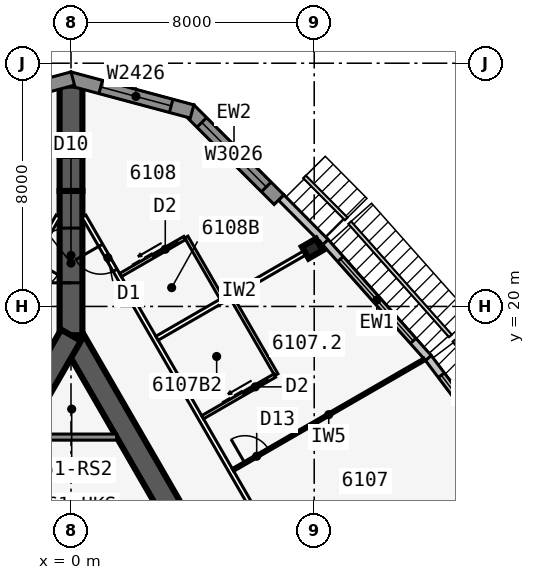
"""IFC4 building model, lengths in metres.
Left out: names, types, materials, properties, quantities, classifications, styles, units other than length and angle.
Written with IfcOpenShell. Run it as: python <this file> out.ifc"""

import sys

from ifc_helpers import new_model, si_unit, direction, frame, frame_2d, origin, origin_2d, place, context, subcontext, project, spatial, polyline, rectangle, i_section, outline, extrude, element, fill, save


model = new_model("IFC4")
c1 = context("Model", 3, precision=1e-05, world=origin(), true_north=direction((0.0, 1.0)))
c2 = subcontext(c1, "Body", "Model", "MODEL_VIEW")
j1 = project(units=[si_unit("LENGTHUNIT", "METRE"), si_unit("PLANEANGLEUNIT", "RADIAN")], contexts=[c1])
p1 = place(None, origin())
s1 = spatial("IfcSite", under=j1, at=p1, CompositionType="ELEMENT")
p2 = place(p1, origin())
s2 = spatial("IfcBuilding", under=s1, at=p2, CompositionType="ELEMENT")
p3 = place(p2, frame((0.0, 0.0, 229.7)))
s3 = spatial("IfcBuildingStorey", under=s2, at=p3, CompositionType="ELEMENT", Elevation=229.7)
p4 = place(p3, frame((16.5, -9.526, 0.0), z_axis=(0.0, 0.0, 1.0), x_axis=(-0.499999749417, 0.866025548458, 0.0)))
e1 = element("IfcWall", 1, at=p4, inside=s3, PredefinedType="SHEAR", context=c2, shape_type="SweptSolid", body=[
    extrude(rectangle(XDim=33.0, YDim=0.75, at=frame_2d((16.5, 0.0))), origin(), (0.0, 0.0, 1.0), 3.6),
])
p5 = place(p4, frame((14.15, 0.0, 0.0)))
e2 = element("IfcOpeningElement", 2, at=p5, cuts=e1, PredefinedType="OPENING", context=c2, shape_type="SweptSolid", body=[
    extrude(rectangle(XDim=1.8, YDim=2.13, at=frame_2d((0.9, 1.065))), frame((0.0, 0.385, 0.0), z_axis=(0.0, -1.0, 0.0), x_axis=(1.0, 0.0, 0.0)), (0.0, 0.0, 1.0), 0.77),
])
p6 = place(p4, frame((12.6, 0.0, 0.0)))
e3 = element("IfcOpeningElement", 3, at=p6, cuts=e1, PredefinedType="OPENING", context=c2, shape_type="SweptSolid", body=[
    extrude(rectangle(XDim=1.0, YDim=2.13, at=frame_2d((0.5, 1.065))), frame((0.0, 0.385, 0.0), z_axis=(0.0, -1.0, 0.0), x_axis=(1.0, 0.0, 0.0)), (0.0, 0.0, 1.0), 0.77),
])
p7 = place(p3, frame((0.0, 19.052, 0.0), z_axis=(0.0, 0.0, 1.0), x_axis=(-0.499999749417, -0.866025548458, 0.0)))
e4 = element("IfcWall", 4, at=p7, inside=s3, PredefinedType="SHEAR", context=c2, shape_type="SweptSolid", body=[
    extrude(rectangle(XDim=33.0, YDim=0.75, at=frame_2d((16.5, 0.0))), origin(), (0.0, 0.0, 1.0), 3.6),
])
p8 = place(p7, frame((14.15, 0.0, 0.0)))
e5 = element("IfcOpeningElement", 5, at=p8, cuts=e4, PredefinedType="OPENING", context=c2, shape_type="SweptSolid", body=[
    extrude(rectangle(XDim=1.8, YDim=2.13, at=frame_2d((0.9, 1.065))), frame((0.0, 0.385, 0.0), z_axis=(0.0, -1.0, 0.0), x_axis=(1.0, 0.0, 0.0)), (0.0, 0.0, 1.0), 0.77),
])
p9 = place(p7, frame((12.6, 0.0, 0.0)))
e6 = element("IfcOpeningElement", 6, at=p9, cuts=e4, PredefinedType="OPENING", context=c2, shape_type="SweptSolid", body=[
    extrude(rectangle(XDim=1.0, YDim=2.13, at=frame_2d((0.5, 1.065))), frame((0.0, 0.385, 0.0), z_axis=(0.0, -1.0, 0.0), x_axis=(1.0, 0.0, 0.0)), (0.0, 0.0, 1.0), 0.77),
])
p10 = place(p3, frame((0.0, 19.052, 0.0), z_axis=(0.0, 0.0, 1.0), x_axis=(0.0, 1.0, 0.0)))
e7 = element("IfcWall", 7, at=p10, inside=s3, PredefinedType="SHEAR", context=c2, shape_type="SweptSolid", body=[
    extrude(rectangle(XDim=4.746, YDim=0.75, at=frame_2d((2.373, 0.0))), origin(), (0.0, 0.0, 1.0), 3.6),
])
p11 = place(p10, frame((1.725, 0.0, 0.0)))
e8 = element("IfcOpeningElement", 8, at=p11, cuts=e7, PredefinedType="OPENING", context=c2, shape_type="SweptSolid", body=[
    extrude(rectangle(XDim=1.8, YDim=2.13, at=frame_2d((0.9, 1.065))), frame((0.0, 0.385, 0.0), z_axis=(0.0, -1.0, 0.0), x_axis=(1.0, 0.0, 0.0)), (0.0, 0.0, 1.0), 0.77),
])
p12 = place(p3, frame((0.0, 23.799, 0.0), z_axis=(0.0, 0.0, 1.0), x_axis=(0.0, 1.0, 0.0)))
e9 = element("IfcWall", 9, at=p12, inside=s3, PredefinedType="SHEAR", context=c2, shape_type="SweptSolid", body=[
    extrude(rectangle(XDim=1.155, YDim=0.75, at=frame_2d((0.577, 0.0))), origin(), (0.0, 0.0, 1.0), 3.6),
])
p13 = place(p3, frame((0.0, 24.953, 0.0), z_axis=(0.0, 0.0, 1.0), x_axis=(0.0, 1.0, 0.0)))
e10 = element("IfcWall", 10, at=p13, inside=s3, PredefinedType="SHEAR", context=c2, shape_type="SweptSolid", body=[
    extrude(rectangle(XDim=2.309, YDim=0.75, at=frame_2d((1.155, 0.0))), origin(), (0.0, 0.0, 1.0), 3.6),
])
p14 = place(p3, frame((7.937, 21.903, 0.0), z_axis=(0.0, 0.0, 1.0), x_axis=(-0.5, 0.866025403784, 0.0)))
e11 = element("IfcColumn", 11, at=p14, inside=s3, PredefinedType="COLUMN", context=c2, shape_type="SweptSolid", body=[
    extrude(i_section(OverallWidth=0.442, OverallDepth=0.531, WebThickness=0.066, FlangeThickness=0.106, at=origin_2d()), origin(), (0.0, 0.0, 1.0), 3.6),
])
p15 = place(p3, frame((14.783, 14.291, 0.0), z_axis=(0.0, 0.0, 1.0), x_axis=(-0.602408653511, 0.798187831388, 0.0)))
e12 = element("IfcWall", 12, at=p15, inside=s3, PredefinedType="STANDARD", context=c2, shape_type="SweptSolid", body=[
    extrude(rectangle(XDim=5.038, YDim=0.25, at=frame_2d((2.519, 0.0))), origin(), (0.0, 0.0, 1.0), 3.35),
])
p16 = place(p15, frame((0.719, 0.0, 0.45)))
e13 = element("IfcOpeningElement", 13, at=p16, cuts=e12, PredefinedType="OPENING", context=c2, shape_type="SweptSolid", body=[
    extrude(rectangle(XDim=3.6, YDim=2.6, at=frame_2d((1.8, 1.3))), frame((0.0, 0.135, 0.0), z_axis=(0.0, -1.0, 0.0), x_axis=(1.0, 0.0, 0.0)), (0.0, 0.0, 1.0), 0.27),
])
p17 = place(p3, frame((11.754, 18.304, 0.0), z_axis=(0.0, 0.0, 1.0), x_axis=(-0.664348996191, 0.747422511876, 0.0)))
e14 = element("IfcWall", 14, at=p17, inside=s3, PredefinedType="STANDARD", context=c2, shape_type="SweptSolid", body=[
    extrude(rectangle(XDim=5.105, YDim=0.25, at=frame_2d((2.552, 0.0))), origin(), (0.0, 0.0, 1.0), 3.35),
])
p18 = place(p17, frame((0.752, 0.0, 0.45)))
e15 = element("IfcOpeningElement", 15, at=p18, cuts=e14, PredefinedType="OPENING", context=c2, shape_type="SweptSolid", body=[
    extrude(rectangle(XDim=3.6, YDim=2.6, at=frame_2d((1.8, 1.3))), frame((0.0, 0.135, 0.0), z_axis=(0.0, -1.0, 0.0), x_axis=(1.0, 0.0, 0.0)), (0.0, 0.0, 1.0), 0.27),
])
p19 = place(p3, frame((8.368, 22.115, 0.0), z_axis=(0.0, 0.0, 1.0), x_axis=(-0.704149946111, 0.710051303352, 0.0)))
e16 = element("IfcWall", 16, at=p19, inside=s3, PredefinedType="STANDARD", context=c2, shape_type="SweptSolid", body=[
    extrude(rectangle(XDim=2.069, YDim=0.25, at=frame_2d((1.034, 0.0))), origin(), (0.0, 0.0, 1.0), 3.35),
])
p20 = place(p3, frame((6.841, 23.512, 0.0), z_axis=(0.0, 0.0, 1.0), x_axis=(-0.707106781187, 0.707106781187, 0.0)))
e17 = element("IfcWall", 17, at=p20, inside=s3, PredefinedType="SOLIDWALL", context=c2, shape_type="SweptSolid", body=[
    extrude(rectangle(XDim=4.184, YDim=0.45, at=frame_2d((2.092, 0.0))), origin(), (0.0, 0.0, 1.0), 3.35),
])
p21 = place(p20, frame((0.592, 0.0, 0.45)))
e18 = element("IfcOpeningElement", 18, at=p21, cuts=e17, PredefinedType="OPENING", context=c2, shape_type="SweptSolid", body=[
    extrude(rectangle(XDim=3.0, YDim=2.6, at=frame_2d((1.5, 1.3))), frame((0.0, 0.235, 0.0), z_axis=(0.0, -1.0, 0.0), x_axis=(1.0, 0.0, 0.0)), (0.0, 0.0, 1.0), 0.47),
])
p22 = place(p3, frame((3.983, 26.413, 0.0), z_axis=(0.0, 0.0, 1.0), x_axis=(-0.965920442324, 0.258839137498, 0.0)))
e19 = element("IfcWall", 19, at=p22, inside=s3, PredefinedType="SOLIDWALL", context=c2, shape_type="SweptSolid", body=[
    extrude(outline(polyline([(4.184, 0.225), (4.124, 0.225), (3.706, 0.113), (3.676, 0.225), (0.0, 0.225), (0.0, -0.225), (4.184, -0.225), (4.184, 0.225)])), origin(), (0.0, 0.0, 1.0), 3.35),
])
p23 = place(p22, frame((0.713, 0.0, 0.45)))
e20 = element("IfcOpeningElement", 20, at=p23, cuts=e19, PredefinedType="OPENING", context=c2, shape_type="SweptSolid", body=[
    extrude(rectangle(XDim=2.4, YDim=2.6, at=frame_2d((1.2, 1.3))), frame((0.0, 0.235, 0.0), z_axis=(0.0, -1.0, 0.0), x_axis=(1.0, 0.0, 0.0)), (0.0, 0.0, 1.0), 0.47),
])
p24 = place(p3, frame((0.058, 27.496, 0.0), z_axis=(0.0, 0.0, 1.0), x_axis=(-0.965920442324, -0.258839137498, 0.0)))
e21 = element("IfcWall", 21, at=p24, inside=s3, PredefinedType="SOLIDWALL", context=c2, shape_type="SweptSolid", body=[
    extrude(outline(polyline([(4.184, 0.225), (0.509, 0.225), (0.479, 0.113), (0.06, 0.225), (0.0, 0.225), (0.0, -0.225), (4.184, -0.225), (4.184, 0.225)])), origin(), (0.0, 0.0, 1.0), 3.35),
])
p25 = place(p24, frame((1.071, 0.0, 0.45)))
e22 = element("IfcOpeningElement", 22, at=p25, cuts=e21, PredefinedType="OPENING", context=c2, shape_type="SweptSolid", body=[
    extrude(rectangle(XDim=2.4, YDim=2.6, at=frame_2d((1.2, 1.3))), frame((0.0, 0.235, 0.0), z_axis=(0.0, -1.0, 0.0), x_axis=(1.0, 0.0, 0.0)), (0.0, 0.0, 1.0), 0.47),
])
p26 = place(p3, frame((20.102, -11.115, 0.0), z_axis=(0.0, 0.0, 1.0), x_axis=(-0.500000265775, 0.866025250339, 0.0)))
e23 = element("IfcWall", 23, at=p26, inside=s3, PredefinedType="PARTITIONING", context=c2, shape_type="SweptSolid", body=[
    extrude(rectangle(XDim=39.354, YDim=0.15, at=frame_2d((19.677, 0.0))), origin(), (0.0, 0.0, 1.0), 3.35),
])
p27 = place(p26, frame((1.102, 0.0, 0.0)))
e24 = element("IfcOpeningElement", 24, at=p27, cuts=e23, PredefinedType="OPENING", context=c2, shape_type="SweptSolid", body=[
    extrude(rectangle(XDim=0.95, YDim=2.13, at=frame_2d((0.475, 1.065))), frame((0.0, 0.085, 0.0), z_axis=(0.0, -1.0, 0.0), x_axis=(1.0, 0.0, 0.0)), (0.0, 0.0, 1.0), 0.17),
])
p28 = place(p26, frame((11.702, 0.0, 0.0)))
e25 = element("IfcOpeningElement", 25, at=p28, cuts=e23, PredefinedType="OPENING", context=c2, shape_type="SweptSolid", body=[
    extrude(rectangle(XDim=0.95, YDim=2.13, at=frame_2d((0.475, 1.065))), frame((0.0, 0.085, 0.0), z_axis=(0.0, -1.0, 0.0), x_axis=(1.0, 0.0, 0.0)), (0.0, 0.0, 1.0), 0.17),
])
p29 = place(p26, frame((26.702, 0.0, 0.0)))
e26 = element("IfcOpeningElement", 26, at=p29, cuts=e23, PredefinedType="OPENING", context=c2, shape_type="SweptSolid", body=[
    extrude(rectangle(XDim=0.95, YDim=2.13, at=frame_2d((0.475, 1.065))), frame((0.0, 0.085, 0.0), z_axis=(0.0, -1.0, 0.0), x_axis=(1.0, 0.0, 0.0)), (0.0, 0.0, 1.0), 0.17),
])
p30 = place(p26, frame((37.302, 0.0, 0.0)))
e27 = element("IfcOpeningElement", 27, at=p30, cuts=e23, PredefinedType="OPENING", context=c2, shape_type="SweptSolid", body=[
    extrude(rectangle(XDim=0.95, YDim=2.13, at=frame_2d((0.475, 1.065))), frame((0.0, 0.085, 0.0), z_axis=(0.0, -1.0, 0.0), x_axis=(1.0, 0.0, 0.0)), (0.0, 0.0, 1.0), 0.17),
])
p31 = place(p3, frame((7.829, 10.293, 0.0), z_axis=(0.0, 0.0, 1.0), x_axis=(0.866030558329, 0.49999107196, 0.0)))
e28 = element("IfcWall", 28, at=p31, inside=s3, PredefinedType="PARTITIONING", context=c2, shape_type="SweptSolid", body=[
    extrude(rectangle(XDim=7.894, YDim=0.1, at=frame_2d((3.947, 0.0))), origin(), (0.0, 0.0, 1.0), 2.25),
])
p32 = place(p31, frame((0.45, 0.0, 0.0)))
e29 = element("IfcOpeningElement", 29, at=p32, cuts=e28, PredefinedType="OPENING", context=c2, shape_type="SweptSolid", body=[
    extrude(rectangle(XDim=0.9, YDim=2.13, at=frame_2d((0.45, 1.065))), frame((0.0, 0.06, 0.0), z_axis=(0.0, -1.0, 0.0), x_axis=(1.0, 0.0, 0.0)), (0.0, 0.0, 1.0), 0.12),
])
p33 = place(p3, frame((5.329, 14.623, 0.0), z_axis=(0.0, 0.0, 1.0), x_axis=(0.866017877653, 0.500013035415, 0.0)))
e30 = element("IfcWall", 30, at=p33, inside=s3, PredefinedType="PARTITIONING", context=c2, shape_type="SweptSolid", body=[
    extrude(rectangle(XDim=7.273, YDim=0.1, at=frame_2d((3.636, 0.0))), origin(), (0.0, 0.0, 1.0), 2.309),
])
p34 = place(p33, frame((0.45, 0.0, 0.0)))
e31 = element("IfcOpeningElement", 31, at=p34, cuts=e30, PredefinedType="OPENING", context=c2, shape_type="SweptSolid", body=[
    extrude(rectangle(XDim=0.9, YDim=2.13, at=frame_2d((0.45, 1.065))), frame((0.0, 0.06, 0.0), z_axis=(0.0, -1.0, 0.0), x_axis=(1.0, 0.0, 0.0)), (0.0, 0.0, 1.0), 0.12),
])
p35 = place(p3, frame((2.829, 18.954, 0.0), z_axis=(0.0, 0.0, 1.0), x_axis=(0.866026604282, 0.499997920671, 0.0)))
e32 = element("IfcWall", 32, at=p35, inside=s3, PredefinedType="PARTITIONING", context=c2, shape_type="SweptSolid", body=[
    extrude(rectangle(XDim=6.24, YDim=0.15, at=frame_2d((3.12, 0.0))), origin(), (0.0, 0.0, 1.0), 2.25),
])
p36 = place(p3, frame((6.753, 17.755, 0.0), z_axis=(0.0, 0.0, 1.0), x_axis=(-0.499990139034, 0.866031096941, 0.0)))
e33 = element("IfcWall", 33, at=p36, inside=s3, PredefinedType="PLUMBINGWALL", context=c2, shape_type="SweptSolid", body=[
    extrude(rectangle(XDim=3.0, YDim=0.12, at=frame_2d((1.5, 0.0))), origin(), (0.0, 0.0, 1.0), 3.35),
])
p37 = place(p3, frame((4.329, 16.355, 0.0), z_axis=(0.0, 0.0, 1.0), x_axis=(0.866035715982, 0.499982138324, 0.0)))
e34 = element("IfcWall", 34, at=p37, inside=s3, PredefinedType="PLUMBINGWALL", context=c2, shape_type="SweptSolid", body=[
    extrude(rectangle(XDim=2.74, YDim=0.12, at=frame_2d((1.37, 0.0))), origin(), (0.0, 0.0, 1.0), 3.35),
])
p38 = place(p37, frame((1.55, 0.0, 0.0)))
e35 = element("IfcOpeningElement", 35, at=p38, cuts=e34, PredefinedType="OPENING", context=c2, shape_type="SweptSolid", body=[
    extrude(rectangle(XDim=0.9, YDim=2.13, at=frame_2d((0.45, 1.065))), frame((0.0, 0.07, 0.0), z_axis=(0.0, -1.0, 0.0), x_axis=(1.0, 0.0, 0.0)), (0.0, 0.0, 1.0), 0.14),
])
p39 = place(p3, frame((4.993, 20.204, 0.0), z_axis=(0.0, 0.0, 1.0), x_axis=(-0.500001309137, 0.866024647952, 0.0)))
e36 = element("IfcWall", 36, at=p39, inside=s3, PredefinedType="PLUMBINGWALL", context=c2, shape_type="SweptSolid", body=[
    extrude(rectangle(XDim=2.4, YDim=0.12, at=frame_2d((1.2, 0.0))), origin(), (0.0, 0.0, 1.0), 3.35),
])
p40 = place(p3, frame((1.628, 21.032, 0.0), z_axis=(0.0, 0.0, 1.0), x_axis=(0.866048967903, 0.499959183527, 0.0)))
e37 = element("IfcWall", 37, at=p40, inside=s3, PredefinedType="PLUMBINGWALL", context=c2, shape_type="SweptSolid", body=[
    extrude(rectangle(XDim=2.44, YDim=0.12, at=frame_2d((1.22, 0.0))), origin(), (0.0, 0.0, 1.0), 3.35),
])
p41 = place(p40, frame((1.25, 0.0, 0.0)))
e38 = element("IfcOpeningElement", 38, at=p41, cuts=e37, PredefinedType="OPENING", context=c2, shape_type="SweptSolid", body=[
    extrude(rectangle(XDim=0.9, YDim=2.13, at=frame_2d((0.45, 1.065))), frame((0.0, 0.07, 0.0), z_axis=(0.0, -1.0, 0.0), x_axis=(1.0, 0.0, 0.0)), (0.0, 0.0, 1.0), 0.14),
])
p42 = place(p3, frame((-0.425, 22.966, 0.0), z_axis=(0.0, 0.0, 1.0), x_axis=(-0.500000265775, -0.866025250339, 0.0)))
e39 = element("IfcWall", 39, at=p42, inside=s3, PredefinedType="PARTITIONING", context=c2, shape_type="SweptSolid", body=[
    extrude(rectangle(XDim=39.354, YDim=0.15, at=frame_2d((19.677, 0.0))), origin(), (0.0, 0.0, 1.0), 3.35),
])
p43 = place(p42, frame((1.665, 0.0, 0.0)))
e40 = element("IfcOpeningElement", 40, at=p43, cuts=e39, PredefinedType="OPENING", context=c2, shape_type="SweptSolid", body=[
    extrude(rectangle(XDim=0.95, YDim=2.13, at=frame_2d((0.475, 1.065))), frame((0.0, 0.085, 0.0), z_axis=(0.0, -1.0, 0.0), x_axis=(1.0, 0.0, 0.0)), (0.0, 0.0, 1.0), 0.17),
])
p44 = place(p42, frame((11.702, 0.0, 0.0)))
e41 = element("IfcOpeningElement", 41, at=p44, cuts=e39, PredefinedType="OPENING", context=c2, shape_type="SweptSolid", body=[
    extrude(rectangle(XDim=0.95, YDim=2.13, at=frame_2d((0.475, 1.065))), frame((0.0, 0.085, 0.0), z_axis=(0.0, -1.0, 0.0), x_axis=(1.0, 0.0, 0.0)), (0.0, 0.0, 1.0), 0.17),
])
p45 = place(p42, frame((21.702, 0.0, 0.0)))
e42 = element("IfcOpeningElement", 42, at=p45, cuts=e39, PredefinedType="OPENING", context=c2, shape_type="SweptSolid", body=[
    extrude(rectangle(XDim=0.95, YDim=2.13, at=frame_2d((0.475, 1.065))), frame((0.0, 0.085, 0.0), z_axis=(0.0, -1.0, 0.0), x_axis=(1.0, 0.0, 0.0)), (0.0, 0.0, 1.0), 0.17),
])
p46 = place(p42, frame((36.739, 0.0, 0.0)))
e43 = element("IfcOpeningElement", 43, at=p46, cuts=e39, PredefinedType="OPENING", context=c2, shape_type="SweptSolid", body=[
    extrude(rectangle(XDim=0.95, YDim=2.13, at=frame_2d((0.475, 1.065))), frame((0.0, 0.085, 0.0), z_axis=(0.0, -1.0, 0.0), x_axis=(1.0, 0.0, 0.0)), (0.0, 0.0, 1.0), 0.17),
])
p47 = place(p3, frame((-1.501, 15.703, 0.0), z_axis=(0.0, 0.0, 1.0), x_axis=(1.0, 0.0, 0.0)))
e44 = element("IfcWall", 44, at=p47, inside=s3, PredefinedType="SOLIDWALL", context=c2, shape_type="SweptSolid", body=[
    extrude(rectangle(XDim=3.002, YDim=0.2, at=frame_2d((1.501, 0.0))), origin(), (0.0, 0.0, 1.0), 3.35),
])
p48 = place(p16, origin())
e45 = element("IfcWindow", 45, at=p48, inside=s3, PartitioningType="SINGLE_PANEL", PredefinedType="WINDOW", context=c2, shape_type="SweptSolid", body=[
    extrude(rectangle(XDim=3.6, YDim=2.6, at=frame_2d((1.8, 1.3))), frame((0.0, 0.03, 0.0), z_axis=(0.0, -1.0, 0.0), x_axis=(1.0, 0.0, 0.0)), (0.0, 0.0, 1.0), 0.06),
])
fill(e13, e45)
p49 = place(p18, origin())
e46 = element("IfcWindow", 46, at=p49, inside=s3, PartitioningType="SINGLE_PANEL", PredefinedType="WINDOW", context=c2, shape_type="SweptSolid", body=[
    extrude(rectangle(XDim=3.6, YDim=2.6, at=frame_2d((1.8, 1.3))), frame((0.0, 0.03, 0.0), z_axis=(0.0, -1.0, 0.0), x_axis=(1.0, 0.0, 0.0)), (0.0, 0.0, 1.0), 0.06),
])
fill(e15, e46)
p50 = place(p21, origin())
e47 = element("IfcWindow", 47, at=p50, inside=s3, PartitioningType="SINGLE_PANEL", PredefinedType="WINDOW", context=c2, shape_type="SweptSolid", body=[
    extrude(rectangle(XDim=3.0, YDim=2.6, at=frame_2d((1.5, 1.3))), frame((0.0, 0.03, 0.0), z_axis=(0.0, -1.0, 0.0), x_axis=(1.0, 0.0, 0.0)), (0.0, 0.0, 1.0), 0.06),
])
fill(e18, e47)
p51 = place(p23, origin())
e48 = element("IfcWindow", 48, at=p51, inside=s3, PartitioningType="SINGLE_PANEL", PredefinedType="WINDOW", context=c2, shape_type="SweptSolid", body=[
    extrude(rectangle(XDim=2.4, YDim=2.6, at=frame_2d((1.2, 1.3))), frame((0.0, 0.03, 0.0), z_axis=(0.0, -1.0, 0.0), x_axis=(1.0, 0.0, 0.0)), (0.0, 0.0, 1.0), 0.06),
])
fill(e20, e48)
p52 = place(p34, origin())
e49 = element("IfcDoor", 49, at=p52, inside=s3, OperationType="SINGLE_SWING_LEFT", PredefinedType="DOOR", context=c2, shape_type="SweptSolid", body=[
    extrude(rectangle(XDim=0.9, YDim=2.13, at=frame_2d((0.45, 1.065))), frame((0.0, 0.025, 0.0), z_axis=(0.0, -1.0, 0.0), x_axis=(1.0, 0.0, 0.0)), (0.0, 0.0, 1.0), 0.05),
])
fill(e31, e49)
p53 = place(p38, origin())
e50 = element("IfcDoor", 50, at=p53, inside=s3, OperationType="SLIDING_TO_LEFT", PredefinedType="DOOR", context=c2, shape_type="SweptSolid", body=[
    extrude(rectangle(XDim=0.9, YDim=2.13, at=frame_2d((0.45, 1.065))), frame((0.0, 0.025, 0.0), z_axis=(0.0, -1.0, 0.0), x_axis=(1.0, 0.0, 0.0)), (0.0, 0.0, 1.0), 0.05),
])
fill(e35, e50)
p54 = place(p41, origin())
e51 = element("IfcDoor", 51, at=p54, inside=s3, OperationType="SLIDING_TO_LEFT", PredefinedType="DOOR", context=c2, shape_type="SweptSolid", body=[
    extrude(rectangle(XDim=0.9, YDim=2.13, at=frame_2d((0.45, 1.065))), frame((0.0, 0.025, 0.0), z_axis=(0.0, -1.0, 0.0), x_axis=(1.0, 0.0, 0.0)), (0.0, 0.0, 1.0), 0.05),
])
fill(e38, e51)
p55 = place(p30, origin())
e52 = element("IfcDoor", 52, at=p55, inside=s3, OperationType="SINGLE_SWING_RIGHT", PredefinedType="DOOR", context=c2, shape_type="SweptSolid", body=[
    extrude(rectangle(XDim=0.95, YDim=2.13, at=frame_2d((0.475, 1.065))), frame((0.0, 0.025, 0.0), z_axis=(0.0, -1.0, 0.0), x_axis=(1.0, 0.0, 0.0)), (0.0, 0.0, 1.0), 0.05),
])
fill(e27, e52)
p56 = place(p11, origin())
e53 = element("IfcDoor", 53, at=p56, inside=s3, OperationType="DOUBLE_DOOR_DOUBLE_SWING", PredefinedType="DOOR", context=c2, shape_type="SweptSolid", body=[
    extrude(rectangle(XDim=1.8, YDim=2.13, at=frame_2d((0.9, 1.065))), frame((0.0, 0.025, 0.0), z_axis=(0.0, -1.0, 0.0), x_axis=(1.0, 0.0, 0.0)), (0.0, 0.0, 1.0), 0.05),
])
fill(e8, e53)
save(model, sys.argv[1])
